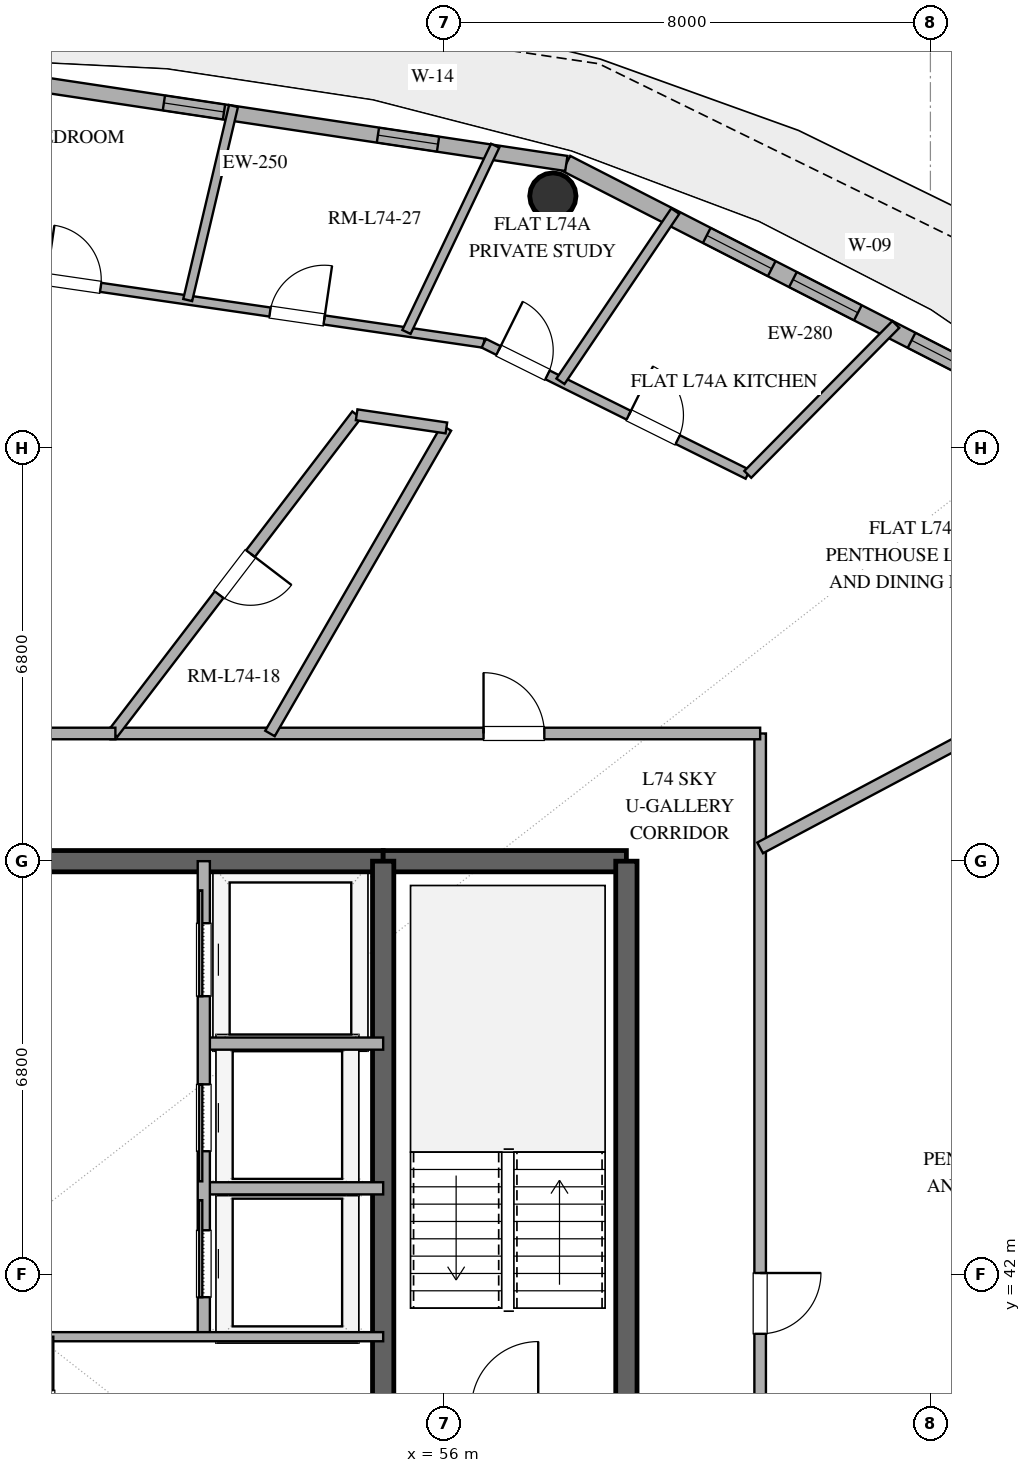
"""IFC4 building model, lengths in metres.
Left out: names, types, materials, properties, quantities, classifications, styles, units other than length and angle.
Written with IfcOpenShell. Run it as: python <this file> out.ifc"""

import sys

from ifc_helpers import new_model, si_unit, direction, frame, frame_2d, origin, origin_2d, place, context, subcontext, project, spatial, rectangle, hollow_circle, extrude, element, fill, save


model = new_model("IFC4")
c1 = context("Model", 3, precision=1e-05, world=origin(), true_north=direction((0.0, 1.0)))
c2 = subcontext(c1, "Body", "Model", "MODEL_VIEW")
j1 = project(units=[si_unit("LENGTHUNIT", "METRE"), si_unit("PLANEANGLEUNIT", "RADIAN")], contexts=[c1])
p1 = place(None, origin())
s1 = spatial("IfcSite", under=j1, at=p1, CompositionType="ELEMENT")
p2 = place(p1, origin())
s2 = spatial("IfcBuilding", under=s1, at=p2, CompositionType="ELEMENT")
p3 = place(p2, frame((0.0, 0.0, 287.4)))
s3 = spatial("IfcBuildingStorey", under=s2, at=p3, CompositionType="ELEMENT", Elevation=287.4)
p4 = place(p3, frame((41.0, 48.8, 0.0), z_axis=(0.0, 0.0, 1.0), x_axis=(1.0, 0.0, 0.0)))
e1 = element("IfcWall", 1, at=p4, inside=s3, PredefinedType="SHEAR", context=c2, shape_type="SweptSolid", body=[
    extrude(rectangle(XDim=14.0, YDim=0.35, at=frame_2d((7.0, 0.0))), origin(), (0.0, 0.0, 1.0), 3.37),
])
p5 = place(p4, frame((6.1, 0.0, 0.0)))
e2 = element("IfcOpeningElement", 2, at=p5, cuts=e1, PredefinedType="OPENING", context=c2, shape_type="SweptSolid", body=[
    extrude(rectangle(XDim=1.8, YDim=2.25, at=frame_2d((0.9, 1.125))), frame((0.0, 0.185, 0.0), z_axis=(0.0, -1.0, 0.0), x_axis=(1.0, 0.0, 0.0)), (0.0, 0.0, 1.0), 0.37),
])
p6 = place(p3, frame((55.0, 48.8, 0.0), z_axis=(0.0, 0.0, 1.0), x_axis=(1.0, 0.0, 0.0)))
e3 = element("IfcWall", 3, at=p6, inside=s3, PredefinedType="SHEAR", context=c2, shape_type="SweptSolid", body=[
    extrude(rectangle(XDim=4.0, YDim=0.35, at=frame_2d((2.0, 0.0))), origin(), (0.0, 0.0, 1.0), 3.37),
])
p7 = place(p3, frame((59.0, 35.2, 0.0), z_axis=(0.0, 0.0, 1.0), x_axis=(0.0, 1.0, 0.0)))
e4 = element("IfcWall", 4, at=p7, inside=s3, PredefinedType="SHEAR", context=c2, shape_type="SweptSolid", body=[
    extrude(rectangle(XDim=13.6, YDim=0.35, at=frame_2d((6.8, 0.0))), origin(), (0.0, 0.0, 1.0), 3.37),
])
p8 = place(p7, frame((1.5, 0.0, 0.0)))
e5 = element("IfcOpeningElement", 5, at=p8, cuts=e4, PredefinedType="OPENING", context=c2, shape_type="SweptSolid", body=[
    extrude(rectangle(XDim=1.2, YDim=2.15, at=frame_2d((0.6, 1.075))), frame((0.0, 0.185, 0.0), z_axis=(0.0, -1.0, 0.0), x_axis=(1.0, 0.0, 0.0)), (0.0, 0.0, 1.0), 0.37),
])
p9 = place(p3, frame((55.0, 35.2, 0.0), z_axis=(0.0, 0.0, 1.0), x_axis=(0.0, 1.0, 0.0)))
e6 = element("IfcWall", 6, at=p9, inside=s3, PredefinedType="SHEAR", context=c2, shape_type="SweptSolid", body=[
    extrude(rectangle(XDim=13.6, YDim=0.35, at=frame_2d((6.8, 0.0))), origin(), (0.0, 0.0, 1.0), 3.37),
])
p10 = place(p9, frame((1.15, 0.0, 0.0)))
e7 = element("IfcOpeningElement", 7, at=p10, cuts=e6, PredefinedType="OPENING", context=c2, shape_type="SweptSolid", body=[
    extrude(rectangle(XDim=1.1, YDim=2.2, at=frame_2d((0.55, 1.1))), frame((0.0, 0.185, 0.0), z_axis=(0.0, -1.0, 0.0), x_axis=(1.0, 0.0, 0.0)), (0.0, 0.0, 1.0), 0.37),
])
p11 = place(p3, frame((57.791, 59.739, 0.0), z_axis=(0.0, 0.0, 1.0), x_axis=(1.0, 0.0, 0.0)))
e8 = element("IfcColumn", 8, at=p11, inside=s3, PredefinedType="COLUMN", context=c2, shape_type="SweptSolid", body=[
    extrude(hollow_circle(Radius=0.381, WallThickness=0.025, at=origin_2d()), origin(), (0.0, 0.0, 1.0), 3.37),
])
p12 = place(p3, frame((66.383, 55.987, 0.0), z_axis=(0.0, 0.0, 1.0), x_axis=(-0.890007394051, 0.455946091699, 0.0)))
e9 = element("IfcWall", 9, at=p12, inside=s3, PredefinedType="SOLIDWALL", context=c2, shape_type="SweptSolid", body=[
    extrude(rectangle(XDim=9.404, YDim=0.28, at=frame_2d((4.702, 0.0))), origin(), (0.0, 0.0, 1.0), 3.37),
])
p13 = place(p12, frame((1.675, 0.0, 0.85)))
e10 = element("IfcOpeningElement", 10, at=p13, cuts=e9, PredefinedType="OPENING", context=c2, shape_type="SweptSolid", body=[
    extrude(rectangle(XDim=1.35, YDim=1.8, at=frame_2d((0.675, 0.9))), frame((0.0, 0.15, 0.0), z_axis=(0.0, -1.0, 0.0), x_axis=(1.0, 0.0, 0.0)), (0.0, 0.0, 1.0), 0.3),
])
p14 = place(p12, frame((4.017, 0.0, 0.85)))
e11 = element("IfcOpeningElement", 11, at=p14, cuts=e9, PredefinedType="OPENING", context=c2, shape_type="SweptSolid", body=[
    extrude(rectangle(XDim=1.2, YDim=1.8, at=frame_2d((0.6, 0.9))), frame((0.0, 0.15, 0.0), z_axis=(0.0, -1.0, 0.0), x_axis=(1.0, 0.0, 0.0)), (0.0, 0.0, 1.0), 0.3),
])
p15 = place(p12, frame((5.609, 0.0, 0.85)))
e12 = element("IfcOpeningElement", 12, at=p15, cuts=e9, PredefinedType="OPENING", context=c2, shape_type="SweptSolid", body=[
    extrude(rectangle(XDim=1.2, YDim=1.8, at=frame_2d((0.6, 0.9))), frame((0.0, 0.15, 0.0), z_axis=(0.0, -1.0, 0.0), x_axis=(1.0, 0.0, 0.0)), (0.0, 0.0, 1.0), 0.3),
])
p16 = place(p3, frame((58.013, 60.274, 0.0), z_axis=(0.0, 0.0, 1.0), x_axis=(-0.988882522213, 0.148698881169, 0.0)))
e13 = element("IfcWall", 13, at=p16, inside=s3, PredefinedType="SOLIDWALL", context=c2, shape_type="SweptSolid", body=[
    extrude(rectangle(XDim=10.125, YDim=0.25, at=frame_2d((5.062, 0.0))), origin(), (0.0, 0.0, 1.0), 3.37),
])
p17 = place(p16, frame((2.134, 0.0, 1.42)))
e14 = element("IfcOpeningElement", 14, at=p17, cuts=e13, PredefinedType="OPENING", context=c2, shape_type="SweptSolid", body=[
    extrude(rectangle(XDim=1.0, YDim=1.05, at=frame_2d((0.5, 0.525))), frame((0.0, 0.135, 0.0), z_axis=(0.0, -1.0, 0.0), x_axis=(1.0, 0.0, 0.0)), (0.0, 0.0, 1.0), 0.27),
])
p18 = place(p16, frame((5.694, 0.0, 0.35)))
e15 = element("IfcOpeningElement", 15, at=p18, cuts=e13, PredefinedType="OPENING", context=c2, shape_type="SweptSolid", body=[
    extrude(rectangle(XDim=1.0, YDim=1.05, at=frame_2d((0.5, 0.525))), frame((0.0, 0.135, 0.0), z_axis=(0.0, -1.0, 0.0), x_axis=(1.0, 0.0, 0.0)), (0.0, 0.0, 1.0), 0.27),
])
for number, where, z_axis, x_axis in (
    (16, (52.05, 43.42, 0.0), (0.0, 0.0, 1.0), (1.0, 0.0, 0.0)),
    (17, (52.05, 45.8, 0.0), (0.0, 0.0, 1.0), (1.0, 0.0, 0.0)),
):
    element("IfcWall", number, at=place(p3, frame(where, z_axis=z_axis, x_axis=x_axis)), inside=s3, PredefinedType="SOLIDWALL", context=c2, shape_type="SweptSolid", body=[
        extrude(rectangle(XDim=2.95, YDim=0.2, at=frame_2d((1.475, 0.0))), origin(), (0.0, 0.0, 1.0), 2.73),
    ])
p19 = place(p3, frame((52.05, 40.98, 0.0), z_axis=(0.0, 0.0, 1.0), x_axis=(0.0, 1.0, 0.0)))
e18 = element("IfcWall", 18, at=p19, inside=s3, PredefinedType="SOLIDWALL", context=c2, shape_type="SweptSolid", body=[
    extrude(rectangle(XDim=7.82, YDim=0.2, at=frame_2d((3.91, 0.0))), origin(), (0.0, 0.0, 1.0), 2.73),
])
p20 = place(p19, frame((0.65, 0.0, 0.0)))
e19 = element("IfcOpeningElement", 19, at=p20, cuts=e18, PredefinedType="OPENING", context=c2, shape_type="SweptSolid", body=[
    extrude(rectangle(XDim=1.1, YDim=2.2, at=frame_2d((0.55, 1.1))), frame((0.0, 0.11, 0.0), z_axis=(0.0, -1.0, 0.0), x_axis=(1.0, 0.0, 0.0)), (0.0, 0.0, 1.0), 0.22),
])
p21 = place(p19, frame((3.05, 0.0, 0.0)))
e20 = element("IfcOpeningElement", 20, at=p21, cuts=e18, PredefinedType="OPENING", context=c2, shape_type="SweptSolid", body=[
    extrude(rectangle(XDim=1.1, YDim=2.2, at=frame_2d((0.55, 1.1))), frame((0.0, 0.11, 0.0), z_axis=(0.0, -1.0, 0.0), x_axis=(1.0, 0.0, 0.0)), (0.0, 0.0, 1.0), 0.22),
])
p22 = place(p19, frame((5.6, 0.0, 0.0)))
e21 = element("IfcOpeningElement", 21, at=p22, cuts=e18, PredefinedType="OPENING", context=c2, shape_type="SweptSolid", body=[
    extrude(rectangle(XDim=1.2, YDim=2.2, at=frame_2d((0.6, 1.1))), frame((0.0, 0.11, 0.0), z_axis=(0.0, -1.0, 0.0), x_axis=(1.0, 0.0, 0.0)), (0.0, 0.0, 1.0), 0.22),
])
p23 = place(p3, frame((49.5, 40.98, 0.0), z_axis=(0.0, 0.0, 1.0), x_axis=(1.0, 0.0, 0.0)))
e22 = element("IfcWall", 22, at=p23, inside=s3, PredefinedType="PARTITIONING", context=c2, shape_type="SweptSolid", body=[
    extrude(rectangle(XDim=5.5, YDim=0.15, at=frame_2d((2.75, 0.0))), origin(), (0.0, 0.0, 1.0), 2.73),
])
p24 = place(p3, frame((49.5, 38.4, 0.0), z_axis=(0.0, 0.0, 1.0), x_axis=(0.0, 1.0, 0.0)))
e23 = element("IfcWall", 23, at=p24, inside=s3, PredefinedType="PARTITIONING", context=c2, shape_type="SweptSolid", body=[
    extrude(rectangle(XDim=2.58, YDim=0.15, at=frame_2d((1.29, 0.0))), origin(), (0.0, 0.0, 1.0), 2.73),
])
p25 = place(p24, frame((0.8, 0.0, 0.0)))
e24 = element("IfcOpeningElement", 24, at=p25, cuts=e23, PredefinedType="OPENING", context=c2, shape_type="SweptSolid", body=[
    extrude(rectangle(XDim=0.9, YDim=2.15, at=frame_2d((0.45, 1.075))), frame((0.0, 0.085, 0.0), z_axis=(0.0, -1.0, 0.0), x_axis=(1.0, 0.0, 0.0)), (0.0, 0.0, 1.0), 0.17),
])
p26 = place(p3, frame((61.2, 50.9, 0.0), z_axis=(0.0, 0.0, 1.0), x_axis=(0.0, -1.0, 0.0)))
e25 = element("IfcWall", 25, at=p26, inside=s3, PredefinedType="PARTITIONING", context=c2, shape_type="SweptSolid", body=[
    extrude(rectangle(XDim=16.9, YDim=0.19, at=frame_2d((8.45, 0.0))), origin(), (0.0, 0.0, 1.0), 2.73),
])
p27 = place(p26, frame((8.873, 0.0, 0.0)))
e26 = element("IfcOpeningElement", 26, at=p27, cuts=e25, PredefinedType="OPENING", context=c2, shape_type="SweptSolid", body=[
    extrude(rectangle(XDim=1.0, YDim=2.2, at=frame_2d((0.5, 1.1))), frame((0.0, 0.105, 0.0), z_axis=(0.0, -1.0, 0.0), x_axis=(1.0, 0.0, 0.0)), (0.0, 0.0, 1.0), 0.21),
])
p28 = place(p3, frame((50.515, 50.9, 0.0), z_axis=(0.0, 0.0, 1.0), x_axis=(1.0, 0.0, 0.0)))
e27 = element("IfcWall", 27, at=p28, inside=s3, PredefinedType="PARTITIONING", context=c2, shape_type="SweptSolid", body=[
    extrude(rectangle(XDim=10.685, YDim=0.19, at=frame_2d((5.342, 0.0))), origin(), (0.0, 0.0, 1.0), 2.73),
])
p29 = place(p28, frame((6.135, 0.0, 0.0)))
e28 = element("IfcOpeningElement", 28, at=p29, cuts=e27, PredefinedType="OPENING", context=c2, shape_type="SweptSolid", body=[
    extrude(rectangle(XDim=1.0, YDim=2.2, at=frame_2d((0.5, 1.1))), frame((0.0, 0.105, 0.0), z_axis=(0.0, -1.0, 0.0), x_axis=(1.0, 0.0, 0.0)), (0.0, 0.0, 1.0), 0.21),
])
p30 = place(p3, frame((54.564, 56.141, 0.0), z_axis=(0.0, 0.0, 1.0), x_axis=(-0.607456974677, -0.794352581614, 0.0)))
e29 = element("IfcWall", 29, at=p30, inside=s3, PredefinedType="PLUMBINGWALL", context=c2, shape_type="SweptSolid", body=[
    extrude(rectangle(XDim=6.598, YDim=0.18, at=frame_2d((3.299, 0.0))), origin(), (0.0, 0.0, 1.0), 2.73),
])
p31 = place(p30, frame((2.874, 0.0, 0.0)))
e30 = element("IfcOpeningElement", 30, at=p31, cuts=e29, PredefinedType="OPENING", context=c2, shape_type="SweptSolid", body=[
    extrude(rectangle(XDim=0.85, YDim=2.1, at=frame_2d((0.425, 1.05))), frame((0.0, 0.1, 0.0), z_axis=(0.0, -1.0, 0.0), x_axis=(1.0, 0.0, 0.0)), (0.0, 0.0, 1.0), 0.2),
])
p32 = place(p3, frame((53.138, 50.9, 0.0), z_axis=(0.0, 0.0, 1.0), x_axis=(0.499985927882, 0.866033528173, 0.0)))
e31 = element("IfcWall", 31, at=p32, inside=s3, PredefinedType="PLUMBINGWALL", context=c2, shape_type="SweptSolid", body=[
    extrude(rectangle(XDim=5.802, YDim=0.18, at=frame_2d((2.901, 0.0))), origin(), (0.0, 0.0, 1.0), 2.73),
])
p33 = place(p3, frame((68.909, 53.118, 0.0), z_axis=(0.0, 0.0, 1.0), x_axis=(-0.882939716422, -0.469486375909, 0.0)))
e32 = element("IfcWall", 32, at=p33, inside=s3, PredefinedType="PARTITIONING", context=c2, shape_type="SweptSolid", body=[
    extrude(rectangle(XDim=8.732, YDim=0.2, at=frame_2d((4.366, 0.0))), origin(), (0.0, 0.0, 1.0), 2.73),
])
p34 = place(p3, frame((48.0, 58.58, 0.0), z_axis=(0.0, 0.0, 1.0), x_axis=(0.989536136377, -0.144285254977, 0.0)))
e33 = element("IfcWall", 33, at=p34, inside=s3, PredefinedType="PARTITIONING", context=c2, shape_type="SweptSolid", body=[
    extrude(rectangle(XDim=8.746, YDim=0.15, at=frame_2d((4.373, 0.0))), origin(), (0.0, 0.0, 1.0), 2.73),
])
p35 = place(p34, frame((1.479, 0.0, 0.0)))
e34 = element("IfcOpeningElement", 34, at=p35, cuts=e33, PredefinedType="OPENING", context=c2, shape_type="SweptSolid", body=[
    extrude(rectangle(XDim=0.9, YDim=2.1, at=frame_2d((0.45, 1.05))), frame((0.0, 0.085, 0.0), z_axis=(0.0, -1.0, 0.0), x_axis=(1.0, 0.0, 0.0)), (0.0, 0.0, 1.0), 0.17),
])
p36 = place(p34, frame((5.193, 0.0, 0.0)))
e35 = element("IfcOpeningElement", 35, at=p36, cuts=e33, PredefinedType="OPENING", context=c2, shape_type="SweptSolid", body=[
    extrude(rectangle(XDim=0.9, YDim=2.1, at=frame_2d((0.45, 1.05))), frame((0.0, 0.085, 0.0), z_axis=(0.0, -1.0, 0.0), x_axis=(1.0, 0.0, 0.0)), (0.0, 0.0, 1.0), 0.17),
])
p37 = place(p3, frame((56.655, 57.318, 0.0), z_axis=(0.0, 0.0, 1.0), x_axis=(0.895572412961, -0.44491578208, 0.0)))
e36 = element("IfcWall", 36, at=p37, inside=s3, PredefinedType="PLUMBINGWALL", context=c2, shape_type="SweptSolid", body=[
    extrude(rectangle(XDim=4.848, YDim=0.16, at=frame_2d((2.424, 0.0))), origin(), (0.0, 0.0, 1.0), 2.73),
])
p38 = place(p37, frame((2.662, 0.0, 0.0)))
e37 = element("IfcOpeningElement", 37, at=p38, cuts=e36, PredefinedType="OPENING", context=c2, shape_type="SweptSolid", body=[
    extrude(rectangle(XDim=0.9, YDim=2.1, at=frame_2d((0.45, 1.05))), frame((0.0, 0.09, 0.0), z_axis=(0.0, -1.0, 0.0), x_axis=(1.0, 0.0, 0.0)), (0.0, 0.0, 1.0), 0.18),
])
p39 = place(p37, frame((0.27, 0.0, 0.0)))
e38 = element("IfcOpeningElement", 38, at=p39, cuts=e36, PredefinedType="OPENING", context=c2, shape_type="SweptSolid", body=[
    extrude(rectangle(XDim=0.9, YDim=2.1, at=frame_2d((0.45, 1.05))), frame((0.0, 0.09, 0.0), z_axis=(0.0, -1.0, 0.0), x_axis=(1.0, 0.0, 0.0)), (0.0, 0.0, 1.0), 0.18),
])
p40 = place(p3, frame((60.997, 55.161, 0.0), z_axis=(0.0, 0.0, 1.0), x_axis=(0.702618919802, 0.711566338113, 0.0)))
e39 = element("IfcWall", 39, at=p40, inside=s3, PredefinedType="PLUMBINGWALL", context=c2, shape_type="SweptSolid", body=[
    extrude(rectangle(XDim=3.465, YDim=0.16, at=frame_2d((1.733, 0.0))), origin(), (0.0, 0.0, 1.0), 2.73),
])
p41 = place(p3, frame((56.842, 60.566, 0.0), z_axis=(0.0, 0.0, 1.0), x_axis=(-0.429975480416, -0.902840565239, 0.0)))
e40 = element("IfcWall", 40, at=p41, inside=s3, PredefinedType="PARTITIONING", context=c2, shape_type="SweptSolid", body=[
    extrude(rectangle(XDim=3.393, YDim=0.15, at=frame_2d((1.696, 0.0))), origin(), (0.0, 0.0, 1.0), 2.73),
])
p42 = place(p3, frame((59.804, 59.49, 0.0), z_axis=(0.0, 0.0, 1.0), x_axis=(-0.559397095435, -0.828899806743, 0.0)))
e41 = element("IfcWall", 41, at=p42, inside=s3, PredefinedType="PLUMBINGWALL", context=c2, shape_type="SweptSolid", body=[
    extrude(rectangle(XDim=3.376, YDim=0.16, at=frame_2d((1.688, 0.0))), origin(), (0.0, 0.0, 1.0), 2.73),
])
p43 = place(p3, frame((51.785, 58.028, 0.0), z_axis=(0.0, 0.0, 1.0), x_axis=(0.2298279545, 0.973231273301, 0.0)))
e42 = element("IfcWall", 42, at=p43, inside=s3, PredefinedType="PARTITIONING", context=c2, shape_type="SweptSolid", body=[
    extrude(rectangle(XDim=3.278, YDim=0.15, at=frame_2d((1.639, 0.0))), origin(), (0.0, 0.0, 1.0), 2.73),
])
p44 = place(p3, frame((47.657, 50.9, 0.0), z_axis=(0.0, 0.0, 1.0), x_axis=(1.0, 0.0, 0.0)))
e43 = element("IfcWall", 43, at=p44, inside=s3, PredefinedType="PARTITIONING", context=c2, shape_type="SweptSolid", body=[
    extrude(rectangle(XDim=2.939, YDim=0.19, at=frame_2d((1.469, 0.0))), origin(), (0.0, 0.0, 1.0), 2.73),
])
p45 = place(p3, frame((56.039, 55.925, 0.0), z_axis=(0.0, 0.0, 1.0), x_axis=(-0.989402061703, 0.14520179165, 0.0)))
e44 = element("IfcWall", 44, at=p45, inside=s3, PredefinedType="PLUMBINGWALL", context=c2, shape_type="SweptSolid", body=[
    extrude(rectangle(XDim=1.491, YDim=0.18, at=frame_2d((0.746, 0.0))), origin(), (0.0, 0.0, 1.0), 2.73),
])
p46 = place(p13, origin())
e45 = element("IfcWindow", 45, at=p46, inside=s3, PartitioningType="SINGLE_PANEL", PredefinedType="WINDOW", context=c2, shape_type="SweptSolid", body=[
    extrude(rectangle(XDim=1.35, YDim=1.8, at=frame_2d((0.675, 0.9))), frame((0.0, 0.03, 0.0), z_axis=(0.0, -1.0, 0.0), x_axis=(1.0, 0.0, 0.0)), (0.0, 0.0, 1.0), 0.06),
])
fill(e10, e45)
p47 = place(p14, origin())
e46 = element("IfcWindow", 46, at=p47, inside=s3, PartitioningType="SINGLE_PANEL", PredefinedType="WINDOW", context=c2, shape_type="SweptSolid", body=[
    extrude(rectangle(XDim=1.2, YDim=1.8, at=frame_2d((0.6, 0.9))), frame((0.0, 0.03, 0.0), z_axis=(0.0, -1.0, 0.0), x_axis=(1.0, 0.0, 0.0)), (0.0, 0.0, 1.0), 0.06),
])
fill(e11, e46)
p48 = place(p15, origin())
e47 = element("IfcWindow", 47, at=p48, inside=s3, PartitioningType="SINGLE_PANEL", PredefinedType="WINDOW", context=c2, shape_type="SweptSolid", body=[
    extrude(rectangle(XDim=1.2, YDim=1.8, at=frame_2d((0.6, 0.9))), frame((0.0, 0.03, 0.0), z_axis=(0.0, -1.0, 0.0), x_axis=(1.0, 0.0, 0.0)), (0.0, 0.0, 1.0), 0.06),
])
fill(e12, e47)
p49 = place(p17, origin())
e48 = element("IfcWindow", 48, at=p49, inside=s3, PartitioningType="SINGLE_PANEL", PredefinedType="WINDOW", context=c2, shape_type="SweptSolid", body=[
    extrude(rectangle(XDim=1.0, YDim=1.05, at=frame_2d((0.5, 0.525))), frame((0.0, 0.03, 0.0), z_axis=(0.0, -1.0, 0.0), x_axis=(1.0, 0.0, 0.0)), (0.0, 0.0, 1.0), 0.06),
])
fill(e14, e48)
p50 = place(p18, origin())
e49 = element("IfcWindow", 49, at=p50, inside=s3, PartitioningType="SINGLE_PANEL", PredefinedType="WINDOW", context=c2, shape_type="SweptSolid", body=[
    extrude(rectangle(XDim=1.0, YDim=1.05, at=frame_2d((0.5, 0.525))), frame((0.0, 0.03, 0.0), z_axis=(0.0, -1.0, 0.0), x_axis=(1.0, 0.0, 0.0)), (0.0, 0.0, 1.0), 0.06),
])
fill(e15, e49)
p51 = place(p20, origin())
e50 = element("IfcDoor", 50, at=p51, inside=s3, OperationType="SLIDING_TO_RIGHT", PredefinedType="DOOR", context=c2, shape_type="SweptSolid", body=[
    extrude(rectangle(XDim=1.1, YDim=2.2, at=frame_2d((0.55, 1.1))), frame((0.0, 0.025, 0.0), z_axis=(0.0, -1.0, 0.0), x_axis=(1.0, 0.0, 0.0)), (0.0, 0.0, 1.0), 0.05),
])
fill(e19, e50)
p52 = place(p21, origin())
e51 = element("IfcDoor", 51, at=p52, inside=s3, OperationType="SLIDING_TO_LEFT", PredefinedType="DOOR", context=c2, shape_type="SweptSolid", body=[
    extrude(rectangle(XDim=1.1, YDim=2.2, at=frame_2d((0.55, 1.1))), frame((0.0, 0.025, 0.0), z_axis=(0.0, -1.0, 0.0), x_axis=(1.0, 0.0, 0.0)), (0.0, 0.0, 1.0), 0.05),
])
fill(e20, e51)
p53 = place(p22, origin())
e52 = element("IfcDoor", 52, at=p53, inside=s3, OperationType="SLIDING_TO_RIGHT", PredefinedType="DOOR", context=c2, shape_type="SweptSolid", body=[
    extrude(rectangle(XDim=1.2, YDim=2.2, at=frame_2d((0.6, 1.1))), frame((0.0, 0.025, 0.0), z_axis=(0.0, -1.0, 0.0), x_axis=(1.0, 0.0, 0.0)), (0.0, 0.0, 1.0), 0.05),
])
fill(e21, e52)
p54 = place(p27, origin())
e53 = element("IfcDoor", 53, at=p54, inside=s3, OperationType="SINGLE_SWING_LEFT", PredefinedType="DOOR", context=c2, shape_type="SweptSolid", body=[
    extrude(rectangle(XDim=1.0, YDim=2.2, at=frame_2d((0.5, 1.1))), frame((0.0, 0.025, 0.0), z_axis=(0.0, -1.0, 0.0), x_axis=(1.0, 0.0, 0.0)), (0.0, 0.0, 1.0), 0.05),
])
fill(e26, e53)
p55 = place(p29, origin())
e54 = element("IfcDoor", 54, at=p55, inside=s3, OperationType="SINGLE_SWING_LEFT", PredefinedType="DOOR", context=c2, shape_type="SweptSolid", body=[
    extrude(rectangle(XDim=1.0, YDim=2.2, at=frame_2d((0.5, 1.1))), frame((0.0, 0.025, 0.0), z_axis=(0.0, -1.0, 0.0), x_axis=(1.0, 0.0, 0.0)), (0.0, 0.0, 1.0), 0.05),
])
fill(e28, e54)
p56 = place(p31, origin())
e55 = element("IfcDoor", 55, at=p56, inside=s3, OperationType="SINGLE_SWING_LEFT", PredefinedType="DOOR", context=c2, shape_type="SweptSolid", body=[
    extrude(rectangle(XDim=0.85, YDim=2.1, at=frame_2d((0.425, 1.05))), frame((0.0, 0.025, 0.0), z_axis=(0.0, -1.0, 0.0), x_axis=(1.0, 0.0, 0.0)), (0.0, 0.0, 1.0), 0.05),
])
fill(e30, e55)
p57 = place(p35, origin())
e56 = element("IfcDoor", 56, at=p57, inside=s3, OperationType="SINGLE_SWING_LEFT", PredefinedType="DOOR", context=c2, shape_type="SweptSolid", body=[
    extrude(rectangle(XDim=0.9, YDim=2.1, at=frame_2d((0.45, 1.05))), frame((0.0, 0.025, 0.0), z_axis=(0.0, -1.0, 0.0), x_axis=(1.0, 0.0, 0.0)), (0.0, 0.0, 1.0), 0.05),
])
fill(e34, e56)
p58 = place(p36, origin())
e57 = element("IfcDoor", 57, at=p58, inside=s3, OperationType="SINGLE_SWING_RIGHT", PredefinedType="DOOR", context=c2, shape_type="SweptSolid", body=[
    extrude(rectangle(XDim=0.9, YDim=2.1, at=frame_2d((0.45, 1.05))), frame((0.0, 0.025, 0.0), z_axis=(0.0, -1.0, 0.0), x_axis=(1.0, 0.0, 0.0)), (0.0, 0.0, 1.0), 0.05),
])
fill(e35, e57)
p59 = place(p38, origin())
e58 = element("IfcDoor", 58, at=p59, inside=s3, OperationType="SINGLE_SWING_LEFT", PredefinedType="DOOR", context=c2, shape_type="SweptSolid", body=[
    extrude(rectangle(XDim=0.9, YDim=2.1, at=frame_2d((0.45, 1.05))), frame((0.0, 0.025, 0.0), z_axis=(0.0, -1.0, 0.0), x_axis=(1.0, 0.0, 0.0)), (0.0, 0.0, 1.0), 0.05),
])
fill(e37, e58)
p60 = place(p39, origin())
e59 = element("IfcDoor", 59, at=p60, inside=s3, OperationType="SINGLE_SWING_LEFT", PredefinedType="DOOR", context=c2, shape_type="SweptSolid", body=[
    extrude(rectangle(XDim=0.9, YDim=2.1, at=frame_2d((0.45, 1.05))), frame((0.0, 0.025, 0.0), z_axis=(0.0, -1.0, 0.0), x_axis=(1.0, 0.0, 0.0)), (0.0, 0.0, 1.0), 0.05),
])
fill(e38, e59)
save(model, sys.argv[1])
